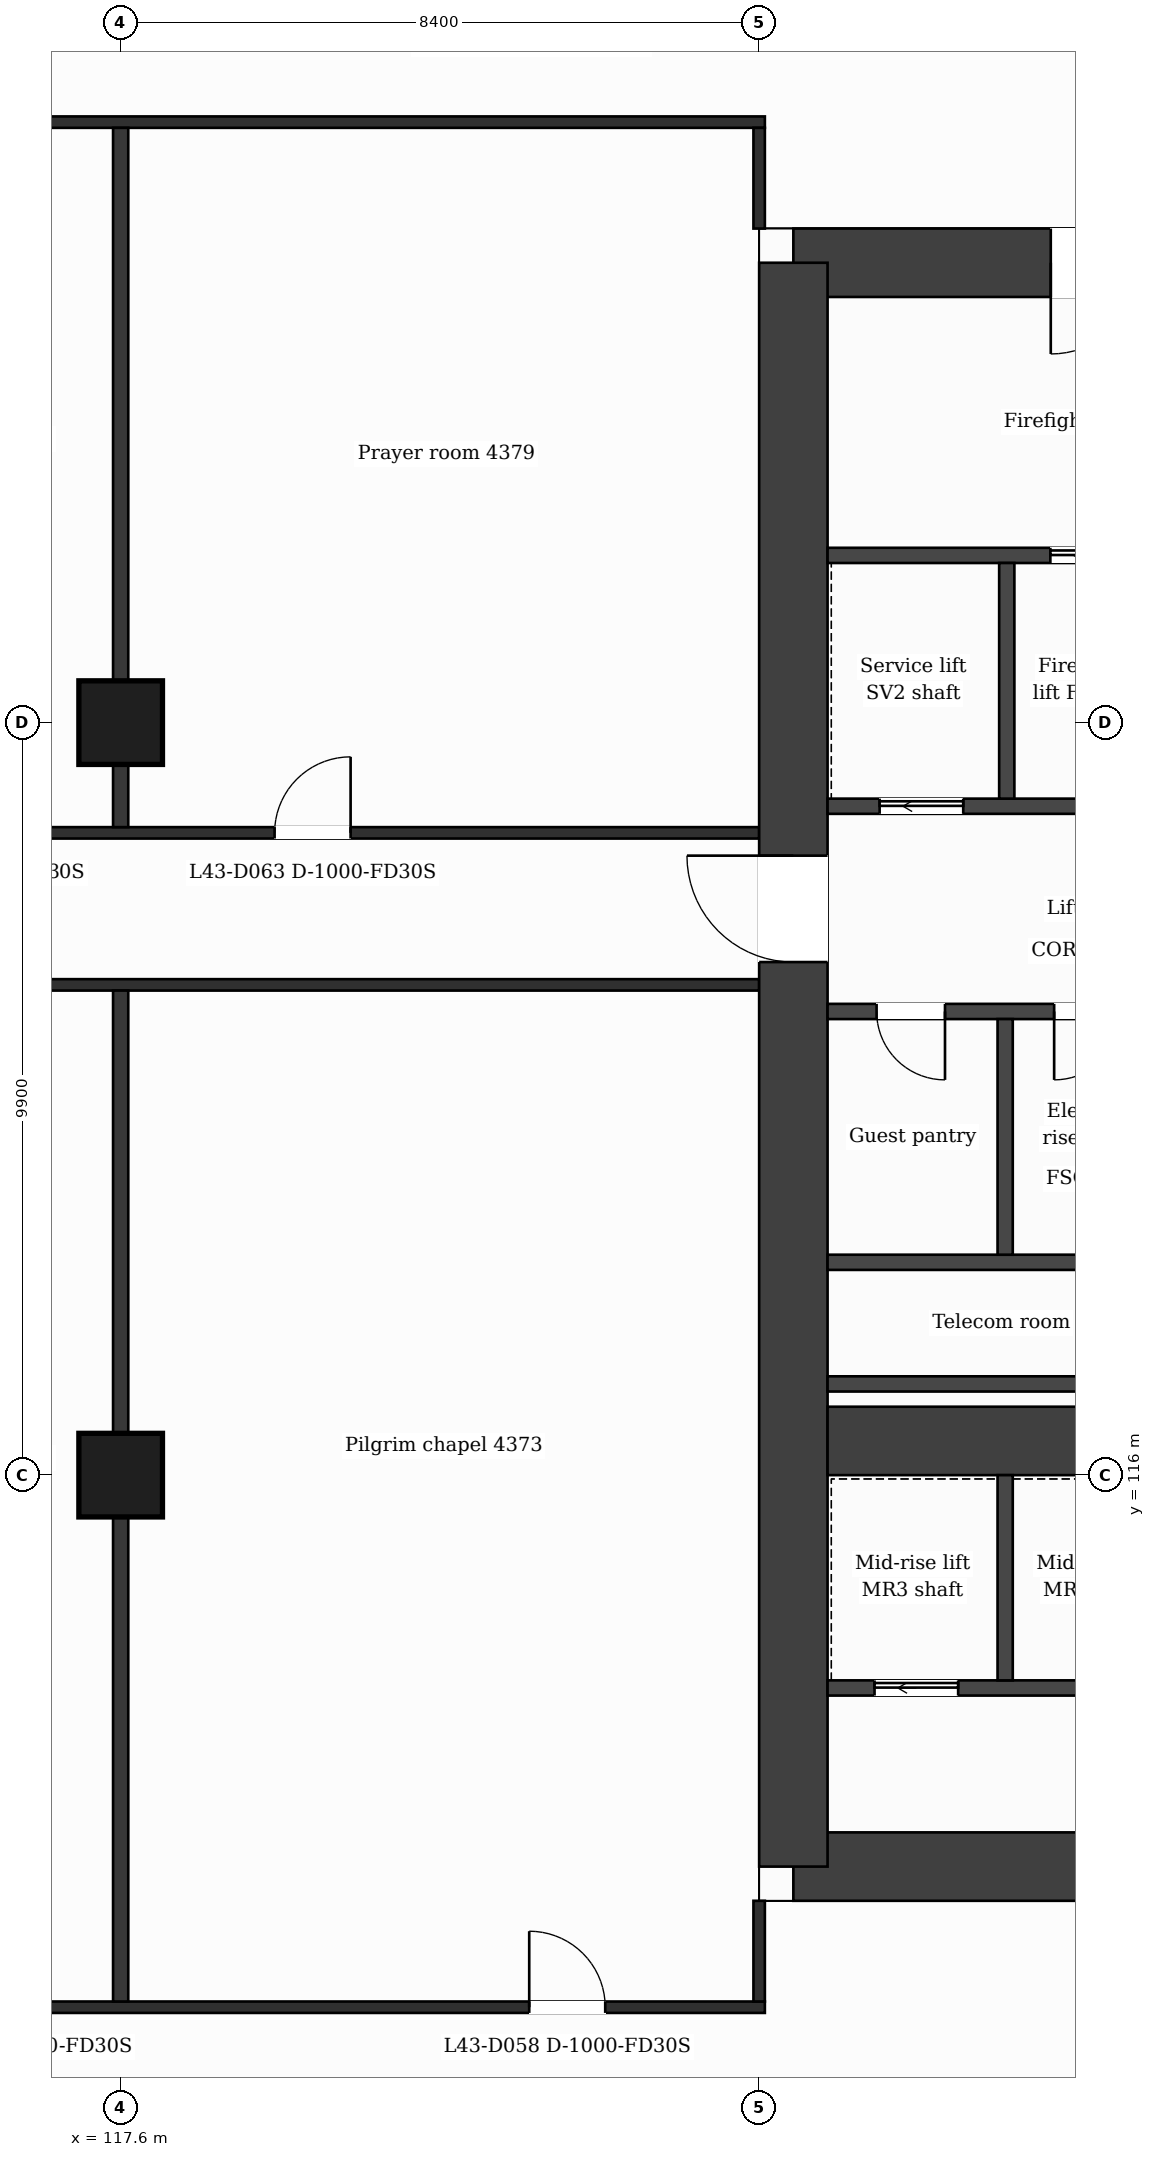
"""IFC4 building model, lengths in metres.
Left out: names, types, materials, properties, quantities, classifications, styles, units other than length and angle.
Written with IfcOpenShell. Run it as: python <this file> out.ifc"""

import sys

from ifc_helpers import new_model, si_unit, direction, frame, frame_2d, origin, origin_2d, place, context, subcontext, project, spatial, rectangle, extrude, element, fill, save


model = new_model("IFC4")
c1 = context("Model", 3, precision=1e-05, world=origin(), true_north=direction((0.0, 1.0)))
c2 = subcontext(c1, "Body", "Model", "MODEL_VIEW")
j1 = project(units=[si_unit("LENGTHUNIT", "METRE"), si_unit("PLANEANGLEUNIT", "RADIAN")], contexts=[c1])
p1 = place(None, origin())
s1 = spatial("IfcSite", under=j1, at=p1, CompositionType="ELEMENT")
p2 = place(p1, origin())
s2 = spatial("IfcBuilding", under=s1, at=p2, CompositionType="ELEMENT")
p3 = place(p2, frame((0.0, 0.0, 181.1)))
s3 = spatial("IfcBuildingStorey", under=s2, at=p3, CompositionType="ELEMENT", Elevation=181.1)
p4 = place(p3, frame((126.45, 131.95, 0.0), z_axis=(0.0, 0.0, 1.0), x_axis=(1.0, 0.0, 0.0)))
e1 = element("IfcWall", 1, at=p4, inside=s3, PredefinedType="SHEAR", context=c2, shape_type="SweptSolid", body=[
    extrude(rectangle(XDim=11.326, YDim=0.9, at=frame_2d((5.663, 0.0))), origin(), (0.0, 0.0, 1.0), 3.7),
])
p5 = place(p4, frame((3.386, 0.0, 0.0)))
e2 = element("IfcOpeningElement", 2, at=p5, cuts=e1, PredefinedType="OPENING", context=c2, shape_type="SweptSolid", body=[
    extrude(rectangle(XDim=1.2, YDim=2.1, at=frame_2d((0.6, 1.05))), frame((0.0, 0.46, 0.0), z_axis=(0.0, -1.0, 0.0), x_axis=(1.0, 0.0, 0.0)), (0.0, 0.0, 1.0), 0.92),
])
p6 = place(p3, frame((140.616, 110.85, 0.0), z_axis=(0.0, 0.0, 1.0), x_axis=(-1.0, 0.0, 0.0)))
e3 = element("IfcWall", 3, at=p6, inside=s3, PredefinedType="SHEAR", context=c2, shape_type="SweptSolid", body=[
    extrude(rectangle(XDim=14.166, YDim=0.9, at=frame_2d((7.083, 0.0))), origin(), (0.0, 0.0, 1.0), 3.7),
])
p7 = place(p6, frame((6.911, 0.0, 0.0)))
e4 = element("IfcOpeningElement", 4, at=p7, cuts=e3, PredefinedType="OPENING", context=c2, shape_type="SweptSolid", body=[
    extrude(rectangle(XDim=1.4, YDim=2.1, at=frame_2d((0.7, 1.05))), frame((0.0, 0.46, 0.0), z_axis=(0.0, -1.0, 0.0), x_axis=(1.0, 0.0, 0.0)), (0.0, 0.0, 1.0), 0.92),
])
p8 = place(p3, frame((126.45, 110.85, 0.0), z_axis=(0.0, 0.0, 1.0), x_axis=(0.0, 1.0, 0.0)))
e5 = element("IfcWall", 5, at=p8, inside=s3, PredefinedType="SHEAR", context=c2, shape_type="SweptSolid", body=[
    extrude(rectangle(XDim=21.1, YDim=0.9, at=frame_2d((10.55, 0.0))), origin(), (0.0, 0.0, 1.0), 3.7),
])
p9 = place(p8, frame((11.9, 0.0, 0.0)))
e6 = element("IfcOpeningElement", 6, at=p9, cuts=e5, PredefinedType="OPENING", context=c2, shape_type="SweptSolid", body=[
    extrude(rectangle(XDim=1.4, YDim=2.1, at=frame_2d((0.7, 1.05))), frame((0.0, 0.46, 0.0), z_axis=(0.0, -1.0, 0.0), x_axis=(1.0, 0.0, 0.0)), (0.0, 0.0, 1.0), 0.92),
])
p10 = place(p3, frame((126.9, 116.45, 0.0), z_axis=(0.0, 0.0, 1.0), x_axis=(1.0, 0.0, 0.0)))
e7 = element("IfcWall", 7, at=p10, inside=s3, PredefinedType="SHEAR", context=c2, shape_type="SweptSolid", body=[
    extrude(rectangle(XDim=5.1, YDim=0.9, at=frame_2d((2.55, 0.0))), origin(), (0.0, 0.0, 1.0), 3.7),
])
for number, where, z_axis, x_axis in (
    (8, (117.6, 116.0, 0.0), (0.0, 0.0, 1.0), (1.0, 0.0, 0.0)),
    (9, (117.6, 125.9, 0.0), (0.0, 0.0, 1.0), (1.0, 0.0, 0.0)),
):
    element("IfcColumn", number, at=place(p3, frame(where, z_axis=z_axis, x_axis=x_axis)), inside=s3, PredefinedType="COLUMN", context=c2, shape_type="SweptSolid", body=[
        extrude(rectangle(XDim=1.1, YDim=1.1, at=origin_2d()), origin(), (0.0, 0.0, 1.0), 3.7),
    ])
p11 = place(p3, frame((100.725, 109.0, 0.0), z_axis=(0.0, 0.0, 1.0), x_axis=(1.0, 0.0, 0.0)))
e10 = element("IfcWall", 10, at=p11, inside=s3, PredefinedType="PARTITIONING", context=c2, shape_type="SweptSolid", body=[
    extrude(rectangle(XDim=25.35, YDim=0.15, at=frame_2d((12.675, 0.0))), origin(), (0.0, 0.0, 1.0), 3.38),
])
p12 = place(p11, frame((2.3, 0.0, 0.0)))
e11 = element("IfcOpeningElement", 11, at=p12, cuts=e10, PredefinedType="OPENING", context=c2, shape_type="SweptSolid", body=[
    extrude(rectangle(XDim=1.0, YDim=2.1, at=frame_2d((0.5, 1.05))), frame((0.0, 0.085, 0.0), z_axis=(0.0, -1.0, 0.0), x_axis=(1.0, 0.0, 0.0)), (0.0, 0.0, 1.0), 0.17),
])
p13 = place(p11, frame((6.5, 0.0, 0.0)))
e12 = element("IfcOpeningElement", 12, at=p13, cuts=e10, PredefinedType="OPENING", context=c2, shape_type="SweptSolid", body=[
    extrude(rectangle(XDim=1.0, YDim=2.1, at=frame_2d((0.5, 1.05))), frame((0.0, 0.085, 0.0), z_axis=(0.0, -1.0, 0.0), x_axis=(1.0, 0.0, 0.0)), (0.0, 0.0, 1.0), 0.17),
])
p14 = place(p11, frame((10.075, 0.0, 0.0)))
e13 = element("IfcOpeningElement", 13, at=p14, cuts=e10, PredefinedType="OPENING", context=c2, shape_type="SweptSolid", body=[
    extrude(rectangle(XDim=1.0, YDim=2.1, at=frame_2d((0.5, 1.05))), frame((0.0, 0.085, 0.0), z_axis=(0.0, -1.0, 0.0), x_axis=(1.0, 0.0, 0.0)), (0.0, 0.0, 1.0), 0.17),
])
p15 = place(p11, frame((14.9, 0.0, 0.0)))
e14 = element("IfcOpeningElement", 14, at=p15, cuts=e10, PredefinedType="OPENING", context=c2, shape_type="SweptSolid", body=[
    extrude(rectangle(XDim=1.0, YDim=2.1, at=frame_2d((0.5, 1.05))), frame((0.0, 0.085, 0.0), z_axis=(0.0, -1.0, 0.0), x_axis=(1.0, 0.0, 0.0)), (0.0, 0.0, 1.0), 0.17),
])
p16 = place(p11, frame((22.25, 0.0, 0.0)))
e15 = element("IfcOpeningElement", 15, at=p16, cuts=e10, PredefinedType="OPENING", context=c2, shape_type="SweptSolid", body=[
    extrude(rectangle(XDim=1.0, YDim=2.1, at=frame_2d((0.5, 1.05))), frame((0.0, 0.085, 0.0), z_axis=(0.0, -1.0, 0.0), x_axis=(1.0, 0.0, 0.0)), (0.0, 0.0, 1.0), 0.17),
])
p17 = place(p3, frame((126.9, 113.2, 0.0), z_axis=(0.0, 0.0, 1.0), x_axis=(1.0, 0.0, 0.0)))
e16 = element("IfcWall", 16, at=p17, inside=s3, PredefinedType="PARTITIONING", context=c2, shape_type="SweptSolid", body=[
    extrude(rectangle(XDim=4.773, YDim=0.2, at=frame_2d((2.387, 0.0))), origin(), (0.0, 0.0, 1.0), 3.38),
])
p18 = place(p17, frame((0.618, 0.0, 0.0)))
e17 = element("IfcOpeningElement", 17, at=p18, cuts=e16, PredefinedType="OPENING", context=c2, shape_type="SweptSolid", body=[
    extrude(rectangle(XDim=1.1, YDim=2.1, at=frame_2d((0.55, 1.05))), frame((0.0, 0.11, 0.0), z_axis=(0.0, -1.0, 0.0), x_axis=(1.0, 0.0, 0.0)), (0.0, 0.0, 1.0), 0.22),
])
for number, where, z_axis, x_axis in (
    (18, (126.9, 117.2, 0.0), (0.0, 0.0, 1.0), (1.0, 0.0, 0.0)),
    (19, (126.9, 118.8, 0.0), (0.0, 0.0, 1.0), (1.0, 0.0, 0.0)),
):
    element("IfcWall", number, at=place(p3, frame(where, z_axis=z_axis, x_axis=x_axis)), inside=s3, PredefinedType="PARTITIONING", context=c2, shape_type="SweptSolid", body=[
        extrude(rectangle(XDim=4.673, YDim=0.2, at=frame_2d((2.336, 0.0))), origin(), (0.0, 0.0, 1.0), 3.38),
    ])
p19 = place(p3, frame((126.9, 122.1, 0.0), z_axis=(0.0, 0.0, 1.0), x_axis=(1.0, 0.0, 0.0)))
e20 = element("IfcWall", 20, at=p19, inside=s3, PredefinedType="PARTITIONING", context=c2, shape_type="SweptSolid", body=[
    extrude(rectangle(XDim=4.673, YDim=0.2, at=frame_2d((2.336, 0.0))), origin(), (0.0, 0.0, 1.0), 3.38),
])
p20 = place(p19, frame((2.981, 0.0, 0.0)))
e21 = element("IfcOpeningElement", 21, at=p20, cuts=e20, PredefinedType="OPENING", context=c2, shape_type="SweptSolid", body=[
    extrude(rectangle(XDim=0.9, YDim=2.1, at=frame_2d((0.45, 1.05))), frame((0.0, 0.11, 0.0), z_axis=(0.0, -1.0, 0.0), x_axis=(1.0, 0.0, 0.0)), (0.0, 0.0, 1.0), 0.22),
])
p21 = place(p19, frame((0.645, 0.0, 0.0)))
e22 = element("IfcOpeningElement", 22, at=p21, cuts=e20, PredefinedType="OPENING", context=c2, shape_type="SweptSolid", body=[
    extrude(rectangle(XDim=0.9, YDim=2.1, at=frame_2d((0.45, 1.05))), frame((0.0, 0.11, 0.0), z_axis=(0.0, -1.0, 0.0), x_axis=(1.0, 0.0, 0.0)), (0.0, 0.0, 1.0), 0.22),
])
p22 = place(p3, frame((100.8, 122.45, 0.0), z_axis=(0.0, 0.0, 1.0), x_axis=(1.0, 0.0, 0.0)))
e23 = element("IfcWall", 23, at=p22, inside=s3, PredefinedType="PARTITIONING", context=c2, shape_type="SweptSolid", body=[
    extrude(rectangle(XDim=25.2, YDim=0.15, at=frame_2d((12.6, 0.0))), origin(), (0.0, 0.0, 1.0), 3.38),
])
p23 = place(p3, frame((100.8, 124.45, 0.0), z_axis=(0.0, 0.0, 1.0), x_axis=(1.0, 0.0, 0.0)))
e24 = element("IfcWall", 24, at=p23, inside=s3, PredefinedType="PARTITIONING", context=c2, shape_type="SweptSolid", body=[
    extrude(rectangle(XDim=25.2, YDim=0.15, at=frame_2d((12.6, 0.0))), origin(), (0.0, 0.0, 1.0), 3.38),
])
p24 = place(p23, frame((0.975, 0.0, 0.0)))
e25 = element("IfcOpeningElement", 25, at=p24, cuts=e24, PredefinedType="OPENING", context=c2, shape_type="SweptSolid", body=[
    extrude(rectangle(XDim=1.0, YDim=2.1, at=frame_2d((0.5, 1.05))), frame((0.0, 0.085, 0.0), z_axis=(0.0, -1.0, 0.0), x_axis=(1.0, 0.0, 0.0)), (0.0, 0.0, 1.0), 0.17),
])
p25 = place(p23, frame((6.05, 0.0, 0.0)))
e26 = element("IfcOpeningElement", 26, at=p25, cuts=e24, PredefinedType="OPENING", context=c2, shape_type="SweptSolid", body=[
    extrude(rectangle(XDim=1.0, YDim=2.1, at=frame_2d((0.5, 1.05))), frame((0.0, 0.085, 0.0), z_axis=(0.0, -1.0, 0.0), x_axis=(1.0, 0.0, 0.0)), (0.0, 0.0, 1.0), 0.17),
])
p26 = place(p23, frame((9.27, 0.0, 0.0)))
e27 = element("IfcOpeningElement", 27, at=p26, cuts=e24, PredefinedType="OPENING", context=c2, shape_type="SweptSolid", body=[
    extrude(rectangle(XDim=1.0, YDim=2.1, at=frame_2d((0.5, 1.05))), frame((0.0, 0.085, 0.0), z_axis=(0.0, -1.0, 0.0), x_axis=(1.0, 0.0, 0.0)), (0.0, 0.0, 1.0), 0.17),
])
p27 = place(p23, frame((14.2, 0.0, 0.0)))
e28 = element("IfcOpeningElement", 28, at=p27, cuts=e24, PredefinedType="OPENING", context=c2, shape_type="SweptSolid", body=[
    extrude(rectangle(XDim=1.0, YDim=2.1, at=frame_2d((0.5, 1.05))), frame((0.0, 0.085, 0.0), z_axis=(0.0, -1.0, 0.0), x_axis=(1.0, 0.0, 0.0)), (0.0, 0.0, 1.0), 0.17),
])
p28 = place(p23, frame((18.825, 0.0, 0.0)))
e29 = element("IfcOpeningElement", 29, at=p28, cuts=e24, PredefinedType="OPENING", context=c2, shape_type="SweptSolid", body=[
    extrude(rectangle(XDim=1.0, YDim=2.1, at=frame_2d((0.5, 1.05))), frame((0.0, 0.085, 0.0), z_axis=(0.0, -1.0, 0.0), x_axis=(1.0, 0.0, 0.0)), (0.0, 0.0, 1.0), 0.17),
])
p29 = place(p3, frame((126.9, 124.8, 0.0), z_axis=(0.0, 0.0, 1.0), x_axis=(1.0, 0.0, 0.0)))
e30 = element("IfcWall", 30, at=p29, inside=s3, PredefinedType="PARTITIONING", context=c2, shape_type="SweptSolid", body=[
    extrude(rectangle(XDim=4.715, YDim=0.2, at=frame_2d((2.358, 0.0))), origin(), (0.0, 0.0, 1.0), 3.38),
])
p30 = place(p29, frame((0.685, 0.0, 0.0)))
e31 = element("IfcOpeningElement", 31, at=p30, cuts=e30, PredefinedType="OPENING", context=c2, shape_type="SweptSolid", body=[
    extrude(rectangle(XDim=1.1, YDim=2.1, at=frame_2d((0.55, 1.05))), frame((0.0, 0.11, 0.0), z_axis=(0.0, -1.0, 0.0), x_axis=(1.0, 0.0, 0.0)), (0.0, 0.0, 1.0), 0.22),
])
p31 = place(p3, frame((126.9, 128.1, 0.0), z_axis=(0.0, 0.0, 1.0), x_axis=(1.0, 0.0, 0.0)))
e32 = element("IfcWall", 32, at=p31, inside=s3, PredefinedType="PARTITIONING", context=c2, shape_type="SweptSolid", body=[
    extrude(rectangle(XDim=4.715, YDim=0.2, at=frame_2d((2.358, 0.0))), origin(), (0.0, 0.0, 1.0), 3.38),
])
p32 = place(p31, frame((2.931, 0.0, 0.0)))
e33 = element("IfcOpeningElement", 33, at=p32, cuts=e32, PredefinedType="OPENING", context=c2, shape_type="SweptSolid", body=[
    extrude(rectangle(XDim=1.1, YDim=2.1, at=frame_2d((0.55, 1.05))), frame((0.0, 0.11, 0.0), z_axis=(0.0, -1.0, 0.0), x_axis=(1.0, 0.0, 0.0)), (0.0, 0.0, 1.0), 0.22),
])
p33 = place(p3, frame((100.725, 133.8, 0.0), z_axis=(0.0, 0.0, 1.0), x_axis=(1.0, 0.0, 0.0)))
e34 = element("IfcWall", 34, at=p33, inside=s3, PredefinedType="PARTITIONING", context=c2, shape_type="SweptSolid", body=[
    extrude(rectangle(XDim=25.35, YDim=0.15, at=frame_2d((12.675, 0.0))), origin(), (0.0, 0.0, 1.0), 3.38),
])
p34 = place(p33, frame((10.7, 0.0, 0.0)))
e35 = element("IfcOpeningElement", 35, at=p34, cuts=e34, PredefinedType="OPENING", context=c2, shape_type="SweptSolid", body=[
    extrude(rectangle(XDim=1.0, YDim=2.1, at=frame_2d((0.5, 1.05))), frame((0.0, 0.085, 0.0), z_axis=(0.0, -1.0, 0.0), x_axis=(1.0, 0.0, 0.0)), (0.0, 0.0, 1.0), 0.17),
])
p35 = place(p3, frame((117.6, 109.075, 0.0), z_axis=(0.0, 0.0, 1.0), x_axis=(0.0, 1.0, 0.0)))
e36 = element("IfcWall", 36, at=p35, inside=s3, PredefinedType="PARTITIONING", context=c2, shape_type="SweptSolid", body=[
    extrude(rectangle(XDim=13.3, YDim=0.2, at=frame_2d((6.65, 0.0))), origin(), (0.0, 0.0, 1.0), 3.38),
])
p36 = place(p3, frame((117.6, 124.525, 0.0), z_axis=(0.0, 0.0, 1.0), x_axis=(0.0, 1.0, 0.0)))
e37 = element("IfcWall", 37, at=p36, inside=s3, PredefinedType="PARTITIONING", context=c2, shape_type="SweptSolid", body=[
    extrude(rectangle(XDim=9.2, YDim=0.2, at=frame_2d((4.6, 0.0))), origin(), (0.0, 0.0, 1.0), 3.38),
])
p37 = place(p3, frame((126.0, 109.075, 0.0), z_axis=(0.0, 0.0, 1.0), x_axis=(0.0, 1.0, 0.0)))
e38 = element("IfcWall", 38, at=p37, inside=s3, PredefinedType="PARTITIONING", context=c2, shape_type="SweptSolid", body=[
    extrude(rectangle(XDim=1.325, YDim=0.15, at=frame_2d((0.663, 0.0))), origin(), (0.0, 0.0, 1.0), 3.38),
])
p38 = place(p3, frame((126.0, 132.4, 0.0), z_axis=(0.0, 0.0, 1.0), x_axis=(0.0, 1.0, 0.0)))
e39 = element("IfcWall", 39, at=p38, inside=s3, PredefinedType="PARTITIONING", context=c2, shape_type="SweptSolid", body=[
    extrude(rectangle(XDim=1.325, YDim=0.15, at=frame_2d((0.663, 0.0))), origin(), (0.0, 0.0, 1.0), 3.38),
])
p39 = place(p3, frame((129.237, 113.3, 0.0), z_axis=(0.0, 0.0, 1.0), x_axis=(0.0, 1.0, 0.0)))
e40 = element("IfcWall", 40, at=p39, inside=s3, PredefinedType="PARTITIONING", context=c2, shape_type="SweptSolid", body=[
    extrude(rectangle(XDim=2.7, YDim=0.2, at=frame_2d((1.35, 0.0))), origin(), (0.0, 0.0, 1.0), 3.38),
])
for number, where, z_axis, x_axis in (
    (41, (129.237, 118.9, 0.0), (0.0, 0.0, 1.0), (0.0, 1.0, 0.0)),
    (42, (129.258, 124.9, 0.0), (0.0, 0.0, 1.0), (0.0, 1.0, 0.0)),
):
    element("IfcWall", number, at=place(p3, frame(where, z_axis=z_axis, x_axis=x_axis)), inside=s3, PredefinedType="PARTITIONING", context=c2, shape_type="SweptSolid", body=[
        extrude(rectangle(XDim=3.1, YDim=0.2, at=frame_2d((1.55, 0.0))), origin(), (0.0, 0.0, 1.0), 3.38),
    ])
p40 = place(p32, origin())
e43 = element("IfcDoor", 43, at=p40, inside=s3, OperationType="SLIDING_TO_LEFT", PredefinedType="DOOR", context=c2, shape_type="SweptSolid", body=[
    extrude(rectangle(XDim=1.1, YDim=2.1, at=frame_2d((0.55, 1.05))), frame((0.0, 0.025, 0.0), z_axis=(0.0, -1.0, 0.0), x_axis=(1.0, 0.0, 0.0)), (0.0, 0.0, 1.0), 0.05),
])
fill(e33, e43)
p41 = place(p30, origin())
e44 = element("IfcDoor", 44, at=p41, inside=s3, OperationType="SLIDING_TO_LEFT", PredefinedType="DOOR", context=c2, shape_type="SweptSolid", body=[
    extrude(rectangle(XDim=1.1, YDim=2.1, at=frame_2d((0.55, 1.05))), frame((0.0, 0.025, 0.0), z_axis=(0.0, -1.0, 0.0), x_axis=(1.0, 0.0, 0.0)), (0.0, 0.0, 1.0), 0.05),
])
fill(e31, e44)
p42 = place(p20, origin())
e45 = element("IfcDoor", 45, at=p42, inside=s3, OperationType="SINGLE_SWING_LEFT", PredefinedType="DOOR", context=c2, shape_type="SweptSolid", body=[
    extrude(rectangle(XDim=0.9, YDim=2.1, at=frame_2d((0.45, 1.05))), frame((0.0, 0.025, 0.0), z_axis=(0.0, -1.0, 0.0), x_axis=(1.0, 0.0, 0.0)), (0.0, 0.0, 1.0), 0.05),
])
fill(e21, e45)
p43 = place(p21, origin())
e46 = element("IfcDoor", 46, at=p43, inside=s3, OperationType="SINGLE_SWING_RIGHT", PredefinedType="DOOR", context=c2, shape_type="SweptSolid", body=[
    extrude(rectangle(XDim=0.9, YDim=2.1, at=frame_2d((0.45, 1.05))), frame((0.0, 0.025, 0.0), z_axis=(0.0, -1.0, 0.0), x_axis=(1.0, 0.0, 0.0)), (0.0, 0.0, 1.0), 0.05),
])
fill(e22, e46)
p44 = place(p18, origin())
e47 = element("IfcDoor", 47, at=p44, inside=s3, OperationType="SLIDING_TO_LEFT", PredefinedType="DOOR", context=c2, shape_type="SweptSolid", body=[
    extrude(rectangle(XDim=1.1, YDim=2.1, at=frame_2d((0.55, 1.05))), frame((0.0, 0.025, 0.0), z_axis=(0.0, -1.0, 0.0), x_axis=(1.0, 0.0, 0.0)), (0.0, 0.0, 1.0), 0.05),
])
fill(e17, e47)
p45 = place(p16, origin())
e48 = element("IfcDoor", 48, at=p45, inside=s3, OperationType="SINGLE_SWING_LEFT", PredefinedType="DOOR", context=c2, shape_type="SweptSolid", body=[
    extrude(rectangle(XDim=1.0, YDim=2.1, at=frame_2d((0.5, 1.05))), frame((0.0, 0.025, 0.0), z_axis=(0.0, -1.0, 0.0), x_axis=(1.0, 0.0, 0.0)), (0.0, 0.0, 1.0), 0.05),
])
fill(e15, e48)
p46 = place(p28, origin())
e49 = element("IfcDoor", 49, at=p46, inside=s3, OperationType="SINGLE_SWING_RIGHT", PredefinedType="DOOR", context=c2, shape_type="SweptSolid", body=[
    extrude(rectangle(XDim=1.0, YDim=2.1, at=frame_2d((0.5, 1.05))), frame((0.0, 0.025, 0.0), z_axis=(0.0, -1.0, 0.0), x_axis=(1.0, 0.0, 0.0)), (0.0, 0.0, 1.0), 0.05),
])
fill(e29, e49)
p47 = place(p5, origin())
e50 = element("IfcDoor", 50, at=p47, inside=s3, OperationType="SINGLE_SWING_LEFT", PredefinedType="DOOR", context=c2, shape_type="SweptSolid", body=[
    extrude(rectangle(XDim=1.2, YDim=2.1, at=frame_2d((0.6, 1.05))), frame((0.0, 0.025, 0.0), z_axis=(0.0, -1.0, 0.0), x_axis=(1.0, 0.0, 0.0)), (0.0, 0.0, 1.0), 0.05),
])
fill(e2, e50)
p48 = place(p9, origin())
e51 = element("IfcDoor", 51, at=p48, inside=s3, OperationType="SINGLE_SWING_RIGHT", PredefinedType="DOOR", context=c2, shape_type="SweptSolid", body=[
    extrude(rectangle(XDim=1.4, YDim=2.1, at=frame_2d((0.7, 1.05))), frame((0.0, 0.025, 0.0), z_axis=(0.0, -1.0, 0.0), x_axis=(1.0, 0.0, 0.0)), (0.0, 0.0, 1.0), 0.05),
])
fill(e6, e51)
save(model, sys.argv[1])
